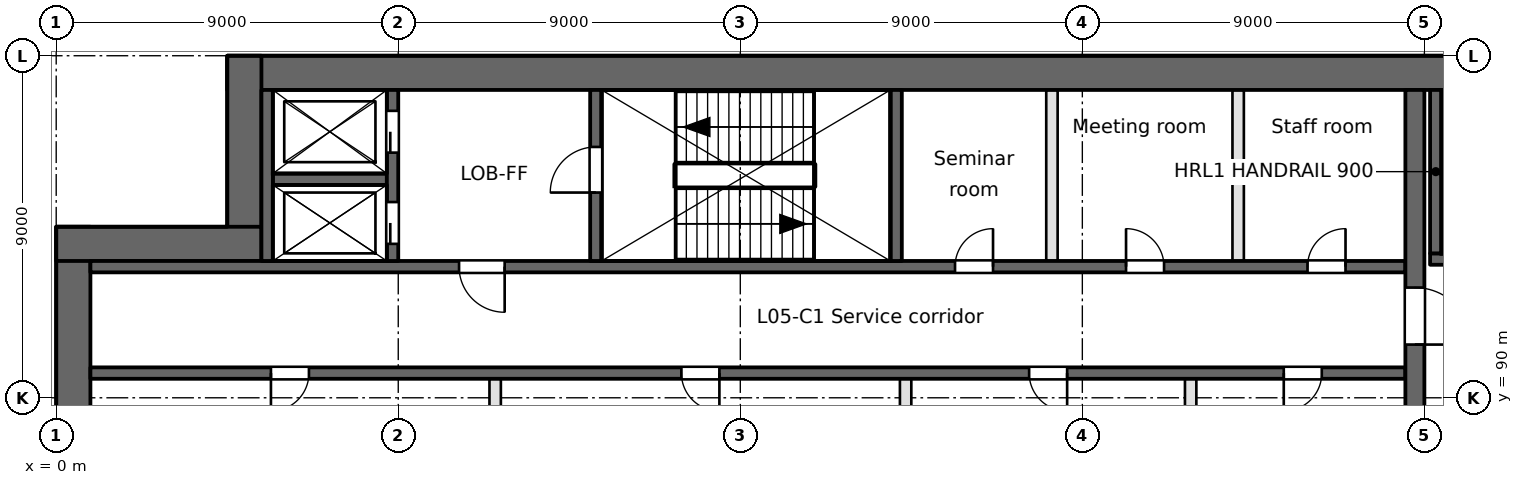
"""IFC4 building model, lengths in metres.
Left out: names, types, materials, properties, quantities, classifications, styles, units other than length and angle.
Written with IfcOpenShell. Run it as: python <this file> out.ifc"""

import sys

from ifc_helpers import new_model, si_unit, direction, frame, frame_2d, origin, place, context, subcontext, project, spatial, rectangle, extrude, element, fill, save


model = new_model("IFC4")
c1 = context("Model", 3, precision=1e-05, world=origin(), true_north=direction((0.0, 1.0)))
c2 = subcontext(c1, "Body", "Model", "MODEL_VIEW")
j1 = project(units=[si_unit("LENGTHUNIT", "METRE"), si_unit("PLANEANGLEUNIT", "RADIAN")], contexts=[c1])
p1 = place(None, origin())
s1 = spatial("IfcSite", under=j1, at=p1, CompositionType="ELEMENT")
p2 = place(p1, origin())
s2 = spatial("IfcBuilding", under=s1, at=p2, CompositionType="ELEMENT")
p3 = place(p2, frame((0.0, 0.0, 26.4)))
s3 = spatial("IfcBuildingStorey", under=s2, at=p3, CompositionType="ELEMENT", Elevation=26.4)
p4 = place(p3, frame((0.45, 94.5, 0.0), z_axis=(0.0, 0.0, 1.0), x_axis=(0.0, -1.0, 0.0)))
e1 = element("IfcWall", 1, at=p4, inside=s3, PredefinedType="SHEAR", context=c2, shape_type="SweptSolid", body=[
    extrude(rectangle(XDim=66.085, YDim=0.9, at=frame_2d((33.042, 0.0))), origin(), (0.0, 0.0, 1.0), 4.8),
])
p5 = place(p3, frame((94.5, 98.55, 0.0), z_axis=(0.0, 0.0, 1.0), x_axis=(-1.0, 0.0, 0.0)))
e2 = element("IfcWall", 2, at=p5, inside=s3, PredefinedType="SHEAR", context=c2, shape_type="SweptSolid", body=[
    extrude(rectangle(XDim=90.0, YDim=0.9, at=frame_2d((45.0, 0.0))), origin(), (0.0, 0.0, 1.0), 4.8),
])
for number, where, z_axis, x_axis in (
    (3, (4.95, 99.0, 0.0), (0.0, 0.0, 1.0), (0.0, -1.0, 0.0)),
    (4, (5.4, 94.05, 0.0), (0.0, 0.0, 1.0), (-1.0, 0.0, 0.0)),
):
    element("IfcWall", number, at=place(p3, frame(where, z_axis=z_axis, x_axis=x_axis)), inside=s3, PredefinedType="SHEAR", context=c2, shape_type="SweptSolid", body=[
        extrude(rectangle(XDim=5.4, YDim=0.9, at=frame_2d((2.7, 0.0))), origin(), (0.0, 0.0, 1.0), 4.8),
    ])
p6 = place(p3, frame((0.9, 90.65, -0.35), z_axis=(0.0, 0.0, 1.0), x_axis=(1.0, 0.0, 0.0)))
e5 = element("IfcWall", 5, at=p6, inside=s3, PredefinedType="SOLIDWALL", context=c2, shape_type="SweptSolid", body=[
    extrude(rectangle(XDim=34.6, YDim=0.3, at=frame_2d((17.3, 0.0))), origin(), (0.0, 0.0, 1.0), 4.7),
])
p7 = place(p6, frame((4.75, 0.0, 0.35)))
e6 = element("IfcOpeningElement", 6, at=p7, cuts=e5, PredefinedType="OPENING", context=c2, shape_type="SweptSolid", body=[
    extrude(rectangle(XDim=1.0, YDim=2.1, at=frame_2d((0.5, 1.05))), frame((0.0, 0.15, 0.0), z_axis=(0.0, -1.0, 0.0), x_axis=(1.0, 0.0, 0.0)), (0.0, 0.0, 1.0), 0.3),
])
p8 = place(p6, frame((24.7, 0.0, 0.35)))
e7 = element("IfcOpeningElement", 7, at=p8, cuts=e5, PredefinedType="OPENING", context=c2, shape_type="SweptSolid", body=[
    extrude(rectangle(XDim=1.0, YDim=2.1, at=frame_2d((0.5, 1.05))), frame((0.0, 0.15, 0.0), z_axis=(0.0, -1.0, 0.0), x_axis=(1.0, 0.0, 0.0)), (0.0, 0.0, 1.0), 0.3),
])
p9 = place(p6, frame((15.55, 0.0, 0.35)))
e8 = element("IfcOpeningElement", 8, at=p9, cuts=e5, PredefinedType="OPENING", context=c2, shape_type="SweptSolid", body=[
    extrude(rectangle(XDim=1.0, YDim=2.1, at=frame_2d((0.5, 1.05))), frame((0.0, 0.15, 0.0), z_axis=(0.0, -1.0, 0.0), x_axis=(1.0, 0.0, 0.0)), (0.0, 0.0, 1.0), 0.3),
])
p10 = place(p6, frame((31.4, 0.0, 0.35)))
e9 = element("IfcOpeningElement", 9, at=p10, cuts=e5, PredefinedType="OPENING", context=c2, shape_type="SweptSolid", body=[
    extrude(rectangle(XDim=1.0, YDim=2.1, at=frame_2d((0.5, 1.05))), frame((0.0, 0.15, 0.0), z_axis=(0.0, -1.0, 0.0), x_axis=(1.0, 0.0, 0.0)), (0.0, 0.0, 1.0), 0.3),
])
p11 = place(p3, frame((0.9, 93.45, -0.35), z_axis=(0.0, 0.0, 1.0), x_axis=(1.0, 0.0, 0.0)))
e10 = element("IfcWall", 10, at=p11, inside=s3, PredefinedType="SOLIDWALL", context=c2, shape_type="SweptSolid", body=[
    extrude(rectangle(XDim=34.6, YDim=0.3, at=frame_2d((17.3, 0.0))), origin(), (0.0, 0.0, 1.0), 4.7),
])
p12 = place(p11, frame((9.7, 0.0, 0.35)))
e11 = element("IfcOpeningElement", 11, at=p12, cuts=e10, PredefinedType="OPENING", context=c2, shape_type="SweptSolid", body=[
    extrude(rectangle(XDim=1.2, YDim=2.1, at=frame_2d((0.6, 1.05))), frame((0.0, 0.15, 0.0), z_axis=(0.0, -1.0, 0.0), x_axis=(1.0, 0.0, 0.0)), (0.0, 0.0, 1.0), 0.3),
])
p13 = place(p11, frame((22.75, 0.0, 0.35)))
e12 = element("IfcOpeningElement", 12, at=p13, cuts=e10, PredefinedType="OPENING", context=c2, shape_type="SweptSolid", body=[
    extrude(rectangle(XDim=1.0, YDim=2.1, at=frame_2d((0.5, 1.05))), frame((0.0, 0.15, 0.0), z_axis=(0.0, -1.0, 0.0), x_axis=(1.0, 0.0, 0.0)), (0.0, 0.0, 1.0), 0.3),
])
p14 = place(p11, frame((27.25, 0.0, 0.35)))
e13 = element("IfcOpeningElement", 13, at=p14, cuts=e10, PredefinedType="OPENING", context=c2, shape_type="SweptSolid", body=[
    extrude(rectangle(XDim=1.0, YDim=2.1, at=frame_2d((0.5, 1.05))), frame((0.0, 0.15, 0.0), z_axis=(0.0, -1.0, 0.0), x_axis=(1.0, 0.0, 0.0)), (0.0, 0.0, 1.0), 0.3),
])
p15 = place(p11, frame((32.025, 0.0, 0.35)))
e14 = element("IfcOpeningElement", 14, at=p15, cuts=e10, PredefinedType="OPENING", context=c2, shape_type="SweptSolid", body=[
    extrude(rectangle(XDim=1.0, YDim=2.1, at=frame_2d((0.5, 1.05))), frame((0.0, 0.15, 0.0), z_axis=(0.0, -1.0, 0.0), x_axis=(1.0, 0.0, 0.0)), (0.0, 0.0, 1.0), 0.3),
])
p16 = place(p3, frame((36.15, 93.65, -0.35), z_axis=(0.0, 0.0, 1.0), x_axis=(1.0, 0.0, 0.0)))
e15 = element("IfcWall", 15, at=p16, inside=s3, PredefinedType="SOLIDWALL", context=c2, shape_type="SweptSolid", body=[
    extrude(rectangle(XDim=8.2, YDim=0.3, at=frame_2d((4.1, 0.0))), origin(), (0.0, 0.0, 1.0), 4.7),
])
p17 = place(p16, frame((0.7, 0.0, 0.35)))
e16 = element("IfcOpeningElement", 16, at=p17, cuts=e15, PredefinedType="OPENING", context=c2, shape_type="SweptSolid", body=[
    extrude(rectangle(XDim=1.2, YDim=2.1, at=frame_2d((0.6, 1.05))), frame((0.0, 0.15, 0.0), z_axis=(0.0, -1.0, 0.0), x_axis=(1.0, 0.0, 0.0)), (0.0, 0.0, 1.0), 0.3),
])
p18 = place(p3, frame((5.7, 95.75, -0.35), z_axis=(0.0, 0.0, 1.0), x_axis=(1.0, 0.0, 0.0)))
e17 = element("IfcWall", 17, at=p18, inside=s3, PredefinedType="SOLIDWALL", context=c2, shape_type="SweptSolid", body=[
    extrude(rectangle(XDim=3.0, YDim=0.3, at=frame_2d((1.5, 0.0))), origin(), (0.0, 0.0, 1.0), 4.7),
])
p19 = place(p3, frame((5.55, 93.6, -0.35), z_axis=(0.0, 0.0, 1.0), x_axis=(0.0, 1.0, 0.0)))
e18 = element("IfcWall", 18, at=p19, inside=s3, PredefinedType="SOLIDWALL", context=c2, shape_type="SweptSolid", body=[
    extrude(rectangle(XDim=4.5, YDim=0.3, at=frame_2d((2.25, 0.0))), origin(), (0.0, 0.0, 1.0), 4.7),
])
p20 = place(p3, frame((8.85, 93.6, -0.35), z_axis=(0.0, 0.0, 1.0), x_axis=(0.0, 1.0, 0.0)))
e19 = element("IfcWall", 19, at=p20, inside=s3, PredefinedType="SOLIDWALL", context=c2, shape_type="SweptSolid", body=[
    extrude(rectangle(XDim=4.5, YDim=0.3, at=frame_2d((2.25, 0.0))), origin(), (0.0, 0.0, 1.0), 4.7),
])
p21 = place(p20, frame((0.45, 0.0, 0.35)))
e20 = element("IfcOpeningElement", 20, at=p21, cuts=e19, PredefinedType="OPENING", context=c2, shape_type="SweptSolid", body=[
    extrude(rectangle(XDim=1.1, YDim=2.1, at=frame_2d((0.55, 1.05))), frame((0.0, 0.15, 0.0), z_axis=(0.0, -1.0, 0.0), x_axis=(1.0, 0.0, 0.0)), (0.0, 0.0, 1.0), 0.3),
])
p22 = place(p20, frame((2.85, 0.0, 0.35)))
e21 = element("IfcOpeningElement", 21, at=p22, cuts=e19, PredefinedType="OPENING", context=c2, shape_type="SweptSolid", body=[
    extrude(rectangle(XDim=1.1, YDim=2.1, at=frame_2d((0.55, 1.05))), frame((0.0, 0.15, 0.0), z_axis=(0.0, -1.0, 0.0), x_axis=(1.0, 0.0, 0.0)), (0.0, 0.0, 1.0), 0.3),
])
p23 = place(p3, frame((11.55, 87.95, 0.0), z_axis=(0.0, 0.0, 1.0), x_axis=(0.0, 1.0, 0.0)))
e22 = element("IfcWall", 22, at=p23, inside=s3, PredefinedType="PARTITIONING", context=c2, shape_type="SweptSolid", body=[
    extrude(rectangle(XDim=2.55, YDim=0.3, at=frame_2d((1.275, 0.0))), origin(), (0.0, 0.0, 1.0), 4.35),
])
p24 = place(p3, frame((14.2, 93.6, -0.35), z_axis=(0.0, 0.0, 1.0), x_axis=(0.0, 1.0, 0.0)))
e23 = element("IfcWall", 23, at=p24, inside=s3, PredefinedType="SOLIDWALL", context=c2, shape_type="SweptSolid", body=[
    extrude(rectangle(XDim=4.5, YDim=0.3, at=frame_2d((2.25, 0.0))), origin(), (0.0, 0.0, 1.0), 4.7),
])
p25 = place(p24, frame((1.8, 0.0, 0.35)))
e24 = element("IfcOpeningElement", 24, at=p25, cuts=e23, PredefinedType="OPENING", context=c2, shape_type="SweptSolid", body=[
    extrude(rectangle(XDim=1.2, YDim=2.1, at=frame_2d((0.6, 1.05))), frame((0.0, 0.15, 0.0), z_axis=(0.0, -1.0, 0.0), x_axis=(1.0, 0.0, 0.0)), (0.0, 0.0, 1.0), 0.3),
])
p26 = place(p3, frame((22.1, 93.6, -0.35), z_axis=(0.0, 0.0, 1.0), x_axis=(0.0, 1.0, 0.0)))
e25 = element("IfcWall", 25, at=p26, inside=s3, PredefinedType="SOLIDWALL", context=c2, shape_type="SweptSolid", body=[
    extrude(rectangle(XDim=4.5, YDim=0.3, at=frame_2d((2.25, 0.0))), origin(), (0.0, 0.0, 1.0), 4.7),
])
p27 = place(p3, frame((22.35, 87.95, 0.0), z_axis=(0.0, 0.0, 1.0), x_axis=(0.0, 1.0, 0.0)))
e26 = element("IfcWall", 26, at=p27, inside=s3, PredefinedType="PARTITIONING", context=c2, shape_type="SweptSolid", body=[
    extrude(rectangle(XDim=2.55, YDim=0.3, at=frame_2d((1.275, 0.0))), origin(), (0.0, 0.0, 1.0), 4.35),
])
p28 = place(p3, frame((26.2, 93.6, 0.0), z_axis=(0.0, 0.0, 1.0), x_axis=(0.0, 1.0, 0.0)))
e27 = element("IfcWall", 27, at=p28, inside=s3, PredefinedType="PARTITIONING", context=c2, shape_type="SweptSolid", body=[
    extrude(rectangle(XDim=4.5, YDim=0.3, at=frame_2d((2.25, 0.0))), origin(), (0.0, 0.0, 1.0), 4.35),
])
p29 = place(p3, frame((29.85, 87.95, 0.0), z_axis=(0.0, 0.0, 1.0), x_axis=(0.0, 1.0, 0.0)))
e28 = element("IfcWall", 28, at=p29, inside=s3, PredefinedType="PARTITIONING", context=c2, shape_type="SweptSolid", body=[
    extrude(rectangle(XDim=2.55, YDim=0.3, at=frame_2d((1.275, 0.0))), origin(), (0.0, 0.0, 1.0), 4.35),
])
p30 = place(p3, frame((31.1, 93.6, 0.0), z_axis=(0.0, 0.0, 1.0), x_axis=(0.0, 1.0, 0.0)))
e29 = element("IfcWall", 29, at=p30, inside=s3, PredefinedType="PARTITIONING", context=c2, shape_type="SweptSolid", body=[
    extrude(rectangle(XDim=4.5, YDim=0.3, at=frame_2d((2.25, 0.0))), origin(), (0.0, 0.0, 1.0), 4.35),
])
p31 = place(p3, frame((35.75, 63.5, -0.35), z_axis=(0.0, 0.0, 1.0), x_axis=(0.0, 1.0, 0.0)))
e30 = element("IfcWall", 30, at=p31, inside=s3, PredefinedType="SOLIDWALL", context=c2, shape_type="SweptSolid", body=[
    extrude(rectangle(XDim=34.6, YDim=0.5, at=frame_2d((17.3, 0.0))), origin(), (0.0, 0.0, 1.0), 4.7),
])
p32 = place(p31, frame((9.7, 0.0, 0.35)))
e31 = element("IfcOpeningElement", 31, at=p32, cuts=e30, PredefinedType="OPENING", context=c2, shape_type="SweptSolid", body=[
    extrude(rectangle(XDim=2.4, YDim=2.1, at=frame_2d((1.2, 1.05))), frame((0.0, 0.25, 0.0), z_axis=(0.0, -1.0, 0.0), x_axis=(1.0, 0.0, 0.0)), (0.0, 0.0, 1.0), 0.5),
])
p33 = place(p31, frame((27.9, 0.0, 0.35)))
e32 = element("IfcOpeningElement", 32, at=p33, cuts=e30, PredefinedType="OPENING", context=c2, shape_type="SweptSolid", body=[
    extrude(rectangle(XDim=1.5, YDim=2.1, at=frame_2d((0.75, 1.05))), frame((0.0, 0.25, 0.0), z_axis=(0.0, -1.0, 0.0), x_axis=(1.0, 0.0, 0.0)), (0.0, 0.0, 1.0), 0.5),
])
p34 = place(p31, frame((1.5, 0.0, 0.35)))
e33 = element("IfcOpeningElement", 33, at=p34, cuts=e30, PredefinedType="OPENING", context=c2, shape_type="SweptSolid", body=[
    extrude(rectangle(XDim=1.2, YDim=2.1, at=frame_2d((0.6, 1.05))), frame((0.0, 0.25, 0.0), z_axis=(0.0, -1.0, 0.0), x_axis=(1.0, 0.0, 0.0)), (0.0, 0.0, 1.0), 0.5),
])
p35 = place(p3, frame((36.3, 93.8, -0.35), z_axis=(0.0, 0.0, 1.0), x_axis=(0.0, 1.0, 0.0)))
e34 = element("IfcWall", 34, at=p35, inside=s3, PredefinedType="SOLIDWALL", context=c2, shape_type="SweptSolid", body=[
    extrude(rectangle(XDim=4.3, YDim=0.3, at=frame_2d((2.15, 0.0))), origin(), (0.0, 0.0, 1.0), 4.7),
])
p36 = place(p21, origin())
e35 = element("IfcDoor", 35, at=p36, inside=s3, OperationType="SLIDING_TO_RIGHT", PredefinedType="DOOR", context=c2, shape_type="SweptSolid", body=[
    extrude(rectangle(XDim=1.1, YDim=2.1, at=frame_2d((0.55, 1.05))), frame((0.0, 0.025, 0.0), z_axis=(0.0, -1.0, 0.0), x_axis=(1.0, 0.0, 0.0)), (0.0, 0.0, 1.0), 0.05),
])
fill(e20, e35)
p37 = place(p22, origin())
e36 = element("IfcDoor", 36, at=p37, inside=s3, OperationType="SLIDING_TO_LEFT", PredefinedType="DOOR", context=c2, shape_type="SweptSolid", body=[
    extrude(rectangle(XDim=1.1, YDim=2.1, at=frame_2d((0.55, 1.05))), frame((0.0, 0.025, 0.0), z_axis=(0.0, -1.0, 0.0), x_axis=(1.0, 0.0, 0.0)), (0.0, 0.0, 1.0), 0.05),
])
fill(e21, e36)
p38 = place(p12, frame((1.2, 0.0, 0.0), z_axis=(0.0, 0.0, 1.0), x_axis=(-1.0, 0.0, 0.0)))
e37 = element("IfcDoor", 37, at=p38, inside=s3, OperationType="SINGLE_SWING_LEFT", PredefinedType="DOOR", context=c2, shape_type="SweptSolid", body=[
    extrude(rectangle(XDim=1.2, YDim=2.1, at=frame_2d((0.6, 1.05))), frame((0.0, 0.025, 0.0), z_axis=(0.0, -1.0, 0.0), x_axis=(1.0, 0.0, 0.0)), (0.0, 0.0, 1.0), 0.05),
])
fill(e11, e37)
p39 = place(p33, frame((1.5, 0.0, 0.0), z_axis=(0.0, 0.0, 1.0), x_axis=(-1.0, 0.0, 0.0)))
e38 = element("IfcDoor", 38, at=p39, inside=s3, OperationType="SINGLE_SWING_RIGHT", PredefinedType="DOOR", context=c2, shape_type="SweptSolid", body=[
    extrude(rectangle(XDim=1.5, YDim=2.1, at=frame_2d((0.75, 1.05))), frame((0.0, 0.025, 0.0), z_axis=(0.0, -1.0, 0.0), x_axis=(1.0, 0.0, 0.0)), (0.0, 0.0, 1.0), 0.05),
])
fill(e32, e38)
p40 = place(p25, origin())
e39 = element("IfcDoor", 39, at=p40, inside=s3, OperationType="SINGLE_SWING_LEFT", PredefinedType="DOOR", context=c2, shape_type="SweptSolid", body=[
    extrude(rectangle(XDim=1.2, YDim=2.1, at=frame_2d((0.6, 1.05))), frame((0.0, 0.025, 0.0), z_axis=(0.0, -1.0, 0.0), x_axis=(1.0, 0.0, 0.0)), (0.0, 0.0, 1.0), 0.05),
])
fill(e24, e39)
p41 = place(p7, frame((1.0, 0.0, 0.0), z_axis=(0.0, 0.0, 1.0), x_axis=(-1.0, 0.0, 0.0)))
e40 = element("IfcDoor", 40, at=p41, inside=s3, OperationType="SINGLE_SWING_RIGHT", PredefinedType="DOOR", context=c2, shape_type="SweptSolid", body=[
    extrude(rectangle(XDim=1.0, YDim=2.1, at=frame_2d((0.5, 1.05))), frame((0.0, 0.025, 0.0), z_axis=(0.0, -1.0, 0.0), x_axis=(1.0, 0.0, 0.0)), (0.0, 0.0, 1.0), 0.05),
])
fill(e6, e40)
p42 = place(p8, frame((1.0, 0.0, 0.0), z_axis=(0.0, 0.0, 1.0), x_axis=(-1.0, 0.0, 0.0)))
e41 = element("IfcDoor", 41, at=p42, inside=s3, OperationType="SINGLE_SWING_LEFT", PredefinedType="DOOR", context=c2, shape_type="SweptSolid", body=[
    extrude(rectangle(XDim=1.0, YDim=2.1, at=frame_2d((0.5, 1.05))), frame((0.0, 0.025, 0.0), z_axis=(0.0, -1.0, 0.0), x_axis=(1.0, 0.0, 0.0)), (0.0, 0.0, 1.0), 0.05),
])
fill(e7, e41)
p43 = place(p9, frame((1.0, 0.0, 0.0), z_axis=(0.0, 0.0, 1.0), x_axis=(-1.0, 0.0, 0.0)))
e42 = element("IfcDoor", 42, at=p43, inside=s3, OperationType="SINGLE_SWING_LEFT", PredefinedType="DOOR", context=c2, shape_type="SweptSolid", body=[
    extrude(rectangle(XDim=1.0, YDim=2.1, at=frame_2d((0.5, 1.05))), frame((0.0, 0.025, 0.0), z_axis=(0.0, -1.0, 0.0), x_axis=(1.0, 0.0, 0.0)), (0.0, 0.0, 1.0), 0.05),
])
fill(e8, e42)
p44 = place(p10, frame((1.0, 0.0, 0.0), z_axis=(0.0, 0.0, 1.0), x_axis=(-1.0, 0.0, 0.0)))
e43 = element("IfcDoor", 43, at=p44, inside=s3, OperationType="SINGLE_SWING_RIGHT", PredefinedType="DOOR", context=c2, shape_type="SweptSolid", body=[
    extrude(rectangle(XDim=1.0, YDim=2.1, at=frame_2d((0.5, 1.05))), frame((0.0, 0.025, 0.0), z_axis=(0.0, -1.0, 0.0), x_axis=(1.0, 0.0, 0.0)), (0.0, 0.0, 1.0), 0.05),
])
fill(e9, e43)
p45 = place(p13, origin())
e44 = element("IfcDoor", 44, at=p45, inside=s3, OperationType="SINGLE_SWING_RIGHT", PredefinedType="DOOR", context=c2, shape_type="SweptSolid", body=[
    extrude(rectangle(XDim=1.0, YDim=2.1, at=frame_2d((0.5, 1.05))), frame((0.0, 0.025, 0.0), z_axis=(0.0, -1.0, 0.0), x_axis=(1.0, 0.0, 0.0)), (0.0, 0.0, 1.0), 0.05),
])
fill(e12, e44)
p46 = place(p14, origin())
e45 = element("IfcDoor", 45, at=p46, inside=s3, OperationType="SINGLE_SWING_LEFT", PredefinedType="DOOR", context=c2, shape_type="SweptSolid", body=[
    extrude(rectangle(XDim=1.0, YDim=2.1, at=frame_2d((0.5, 1.05))), frame((0.0, 0.025, 0.0), z_axis=(0.0, -1.0, 0.0), x_axis=(1.0, 0.0, 0.0)), (0.0, 0.0, 1.0), 0.05),
])
fill(e13, e45)
p47 = place(p15, origin())
e46 = element("IfcDoor", 46, at=p47, inside=s3, OperationType="SINGLE_SWING_RIGHT", PredefinedType="DOOR", context=c2, shape_type="SweptSolid", body=[
    extrude(rectangle(XDim=1.0, YDim=2.1, at=frame_2d((0.5, 1.05))), frame((0.0, 0.025, 0.0), z_axis=(0.0, -1.0, 0.0), x_axis=(1.0, 0.0, 0.0)), (0.0, 0.0, 1.0), 0.05),
])
fill(e14, e46)
save(model, sys.argv[1])
